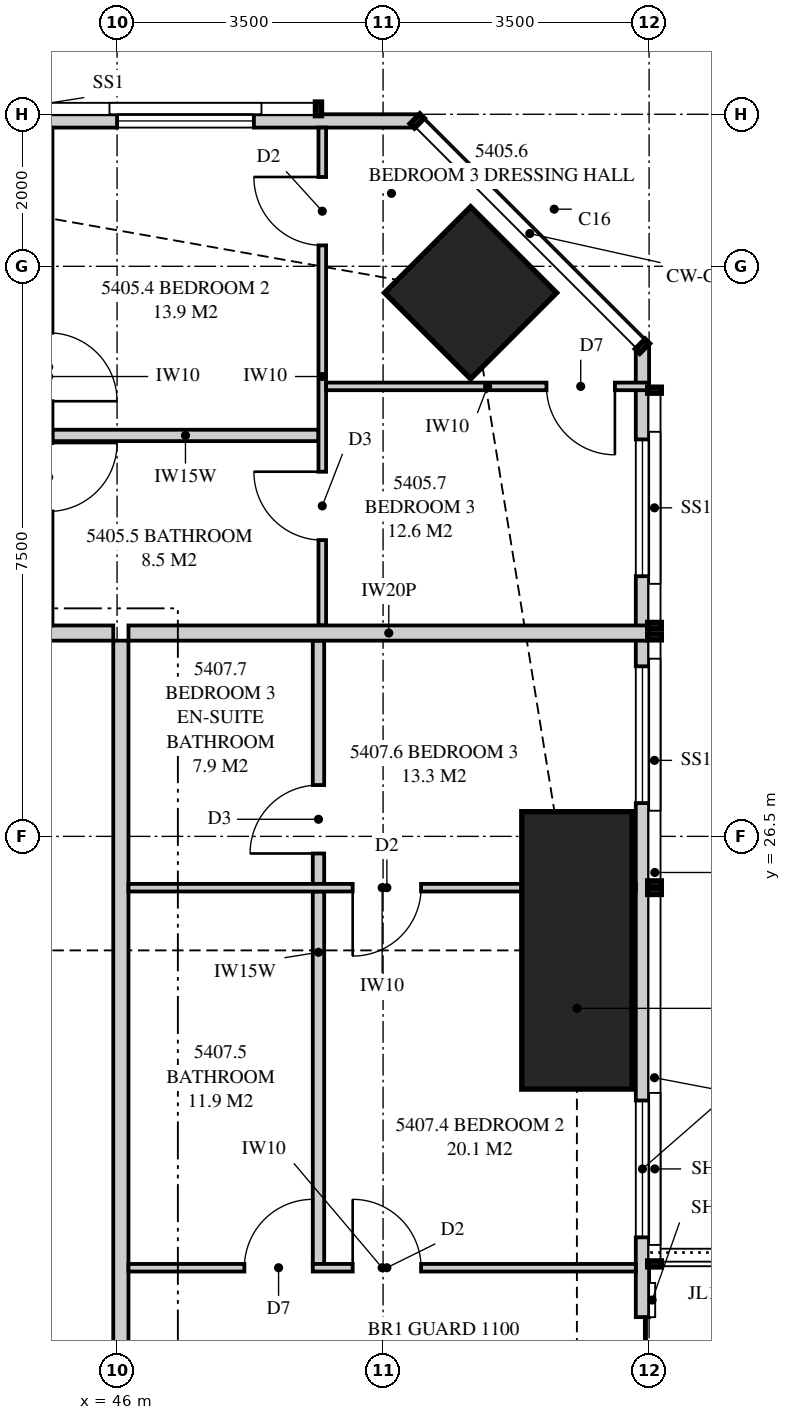
"""IFC4 building model, lengths in metres.
Left out: names, types, materials, properties, quantities, classifications, styles, units other than length and angle.
Written with IfcOpenShell. Run it as: python <this file> out.ifc"""

import sys

from ifc_helpers import new_model, si_unit, direction, frame, frame_2d, origin, origin_2d, place, context, subcontext, project, spatial, polyline, rectangle, outline, extrude, element, fill, save


model = new_model("IFC4")
c1 = context("Model", 3, precision=1e-05, world=origin(), true_north=direction((0.0, 1.0)))
c2 = subcontext(c1, "Body", "Model", "MODEL_VIEW")
j1 = project(units=[si_unit("LENGTHUNIT", "METRE"), si_unit("PLANEANGLEUNIT", "RADIAN")], contexts=[c1])
p1 = place(None, origin())
s1 = spatial("IfcSite", under=j1, at=p1, CompositionType="ELEMENT")
p2 = place(p1, origin())
s2 = spatial("IfcBuilding", under=s1, at=p2, CompositionType="ELEMENT")
p3 = place(p2, frame((0.0, 0.0, 197.9)))
s3 = spatial("IfcBuildingStorey", under=s2, at=p3, CompositionType="ELEMENT", Elevation=197.9)
p4 = place(p3, frame((52.05, 25.0, 0.0), z_axis=(0.0, 0.0, 1.0), x_axis=(1.0, 0.0, 0.0)))
e1 = element("IfcColumn", 1, at=p4, inside=s3, PredefinedType="COLUMN", context=c2, shape_type="SweptSolid", body=[
    extrude(rectangle(XDim=1.45, YDim=3.65, at=origin_2d()), origin(), (0.0, 0.0, 1.0), 3.35),
])
p5 = place(p3, frame((50.652, 33.652, 0.0), z_axis=(0.0, 0.0, 1.0), x_axis=(0.707106781187, 0.707106781187, 0.0)))
e2 = element("IfcColumn", 2, at=p5, inside=s3, PredefinedType="COLUMN", context=c2, shape_type="SweptSolid", body=[
    extrude(rectangle(XDim=1.6, YDim=1.6, at=origin_2d()), origin(), (0.0, 0.0, 1.0), 3.35),
])
p6 = place(p3, frame((52.913, 3.051, 0.0), z_axis=(0.0, 0.0, 1.0), x_axis=(0.0, 1.0, 0.0)))
e3 = element("IfcWall", 3, at=p6, inside=s3, PredefinedType="SOLIDWALL", context=c2, shape_type="SweptSolid", body=[
    extrude(outline(polyline([(0.0, 0.0), (29.897, 0.0), (29.897, 3.11), (22.167, 3.11), (22.167, 2.15), (22.074, 2.15), (22.074, 3.11), (21.949, 3.11), (21.949, 2.15), (9.949, 2.15), (9.949, 3.11), (9.847, 3.11), (9.847, 2.15), (9.706, 2.15), (9.706, 3.11), (0.0, 3.11), (0.0, 0.0)])), frame((0.0, 0.087, 0.0), z_axis=(0.0, -1.0, 0.0), x_axis=(1.0, 0.0, 0.0)), (0.0, 0.0, 1.0), 0.175),
])
p7 = place(p6, frame((5.374, 0.0, 0.4)))
e4 = element("IfcOpeningElement", 4, at=p7, cuts=e3, PredefinedType="OPENING", context=c2, shape_type="SweptSolid", body=[
    extrude(rectangle(XDim=1.8, YDim=1.7, at=frame_2d((0.9, 0.85))), frame((0.0, 0.097, 0.0), z_axis=(0.0, -1.0, 0.0), x_axis=(1.0, 0.0, 0.0)), (0.0, 0.0, 1.0), 0.195),
])
p8 = place(p6, frame((12.199, 0.0, 0.4)))
e5 = element("IfcOpeningElement", 5, at=p8, cuts=e3, PredefinedType="OPENING", context=c2, shape_type="SweptSolid", body=[
    extrude(rectangle(XDim=1.8, YDim=1.7, at=frame_2d((0.9, 0.85))), frame((0.0, 0.097, 0.0), z_axis=(0.0, -1.0, 0.0), x_axis=(1.0, 0.0, 0.0)), (0.0, 0.0, 1.0), 0.195),
])
p9 = place(p6, frame((15.324, 0.0, 0.0)))
e6 = element("IfcOpeningElement", 6, at=p9, cuts=e3, PredefinedType="OPENING", context=c2, shape_type="SweptSolid", body=[
    extrude(rectangle(XDim=1.8, YDim=2.1, at=frame_2d((0.9, 1.05))), frame((0.0, 0.097, 0.0), z_axis=(0.0, -1.0, 0.0), x_axis=(1.0, 0.0, 0.0)), (0.0, 0.0, 1.0), 0.195),
])
p10 = place(p6, frame((18.174, 0.0, 0.4)))
e7 = element("IfcOpeningElement", 7, at=p10, cuts=e3, PredefinedType="OPENING", context=c2, shape_type="SweptSolid", body=[
    extrude(rectangle(XDim=1.8, YDim=1.7, at=frame_2d((0.9, 0.85))), frame((0.0, 0.097, 0.0), z_axis=(0.0, -1.0, 0.0), x_axis=(1.0, 0.0, 0.0)), (0.0, 0.0, 1.0), 0.195),
])
p11 = place(p6, frame((23.886, 0.0, 0.4)))
e8 = element("IfcOpeningElement", 8, at=p11, cuts=e3, PredefinedType="OPENING", context=c2, shape_type="SweptSolid", body=[
    extrude(rectangle(XDim=1.8, YDim=1.7, at=frame_2d((0.9, 0.85))), frame((0.0, 0.097, 0.0), z_axis=(0.0, -1.0, 0.0), x_axis=(1.0, 0.0, 0.0)), (0.0, 0.0, 1.0), 0.195),
])
p12 = place(p6, frame((26.871, 0.0, 0.4)))
e9 = element("IfcOpeningElement", 9, at=p12, cuts=e3, PredefinedType="OPENING", context=c2, shape_type="SweptSolid", body=[
    extrude(rectangle(XDim=1.8, YDim=1.7, at=frame_2d((0.9, 0.85))), frame((0.0, 0.097, 0.0), z_axis=(0.0, -1.0, 0.0), x_axis=(1.0, 0.0, 0.0)), (0.0, 0.0, 1.0), 0.195),
])
p13 = place(p3, frame((49.949, 35.913, 0.0), z_axis=(0.0, 0.0, 1.0), x_axis=(-1.0, 0.0, 0.0)))
e10 = element("IfcWall", 10, at=p13, inside=s3, PredefinedType="SOLIDWALL", context=c2, shape_type="SweptSolid", body=[
    extrude(outline(polyline([(0.0, 0.0), (34.897, 0.0), (34.897, 3.11), (27.91, 3.11), (27.91, 2.15), (27.836, 2.15), (27.836, 3.11), (27.699, 3.11), (27.699, 2.15), (7.199, 2.15), (7.199, 3.11), (7.062, 3.11), (7.062, 2.15), (6.987, 2.15), (6.987, 3.11), (0.0, 3.11), (0.0, 0.0)])), frame((0.0, 0.087, 0.0), z_axis=(0.0, -1.0, 0.0), x_axis=(1.0, 0.0, 0.0)), (0.0, 0.0, 1.0), 0.175),
])
p14 = place(p13, frame((2.149, 0.0, 0.4)))
e11 = element("IfcOpeningElement", 11, at=p14, cuts=e10, PredefinedType="OPENING", context=c2, shape_type="SweptSolid", body=[
    extrude(rectangle(XDim=1.8, YDim=1.7, at=frame_2d((0.9, 0.85))), frame((0.0, 0.097, 0.0), z_axis=(0.0, -1.0, 0.0), x_axis=(1.0, 0.0, 0.0)), (0.0, 0.0, 1.0), 0.195),
])
p15 = place(p13, frame((9.636, 0.0, 0.4)))
e12 = element("IfcOpeningElement", 12, at=p15, cuts=e10, PredefinedType="OPENING", context=c2, shape_type="SweptSolid", body=[
    extrude(rectangle(XDim=1.8, YDim=1.7, at=frame_2d((0.9, 0.85))), frame((0.0, 0.097, 0.0), z_axis=(0.0, -1.0, 0.0), x_axis=(1.0, 0.0, 0.0)), (0.0, 0.0, 1.0), 0.195),
])
p16 = place(p13, frame((13.174, 0.0, 0.0)))
e13 = element("IfcOpeningElement", 13, at=p16, cuts=e10, PredefinedType="OPENING", context=c2, shape_type="SweptSolid", body=[
    extrude(rectangle(XDim=1.8, YDim=2.1, at=frame_2d((0.9, 1.05))), frame((0.0, 0.097, 0.0), z_axis=(0.0, -1.0, 0.0), x_axis=(1.0, 0.0, 0.0)), (0.0, 0.0, 1.0), 0.195),
])
p17 = place(p13, frame((19.374, 0.0, 0.4)))
e14 = element("IfcOpeningElement", 14, at=p17, cuts=e10, PredefinedType="OPENING", context=c2, shape_type="SweptSolid", body=[
    extrude(rectangle(XDim=1.8, YDim=1.7, at=frame_2d((0.9, 0.85))), frame((0.0, 0.097, 0.0), z_axis=(0.0, -1.0, 0.0), x_axis=(1.0, 0.0, 0.0)), (0.0, 0.0, 1.0), 0.195),
])
p18 = place(p13, frame((23.224, 0.0, 0.4)))
e15 = element("IfcOpeningElement", 15, at=p18, cuts=e10, PredefinedType="OPENING", context=c2, shape_type="SweptSolid", body=[
    extrude(rectangle(XDim=2.4, YDim=1.7, at=frame_2d((1.2, 0.85))), frame((0.0, 0.097, 0.0), z_axis=(0.0, -1.0, 0.0), x_axis=(1.0, 0.0, 0.0)), (0.0, 0.0, 1.0), 0.195),
])
p19 = place(p13, frame((32.399, 0.0, 0.4)))
e16 = element("IfcOpeningElement", 16, at=p19, cuts=e10, PredefinedType="OPENING", context=c2, shape_type="SweptSolid", body=[
    extrude(rectangle(XDim=1.8, YDim=1.7, at=frame_2d((0.9, 0.85))), frame((0.0, 0.097, 0.0), z_axis=(0.0, -1.0, 0.0), x_axis=(1.0, 0.0, 0.0)), (0.0, 0.0, 1.0), 0.195),
])
p20 = place(p3, frame((45.1, 35.825, 0.0), z_axis=(0.0, 0.0, 1.0), x_axis=(0.0, -1.0, 0.0)))
e17 = element("IfcWall", 17, at=p20, inside=s3, PredefinedType="PARTITIONING", context=c2, shape_type="SweptSolid", body=[
    extrude(outline(polyline([(0.0, 0.0), (6.55, 0.0), (6.55, 3.11), (2.064, 3.11), (2.064, 2.15), (0.318, 2.15), (0.318, 3.11), (0.0, 3.11), (0.0, 0.0)])), frame((0.0, 0.05, 0.0), z_axis=(0.0, -1.0, 0.0), x_axis=(1.0, 0.0, 0.0)), (0.0, 0.0, 1.0), 0.1),
])
p21 = place(p20, frame((2.7, 0.0, 0.0)))
e18 = element("IfcOpeningElement", 18, at=p21, cuts=e17, PredefinedType="OPENING", context=c2, shape_type="SweptSolid", body=[
    extrude(rectangle(XDim=0.9, YDim=2.1, at=frame_2d((0.45, 1.05))), frame((0.0, 0.06, 0.0), z_axis=(0.0, -1.0, 0.0), x_axis=(1.0, 0.0, 0.0)), (0.0, 0.0, 1.0), 0.12),
])
p22 = place(p20, frame((4.15, 0.0, 0.0)))
e19 = element("IfcOpeningElement", 19, at=p22, cuts=e17, PredefinedType="OPENING", context=c2, shape_type="SweptSolid", body=[
    extrude(rectangle(XDim=0.9, YDim=2.1, at=frame_2d((0.45, 1.05))), frame((0.0, 0.06, 0.0), z_axis=(0.0, -1.0, 0.0), x_axis=(1.0, 0.0, 0.0)), (0.0, 0.0, 1.0), 0.12),
])
p23 = place(p3, frame((48.7, 35.825, 0.0), z_axis=(0.0, 0.0, 1.0), x_axis=(0.0, -1.0, 0.0)))
e20 = element("IfcWall", 20, at=p23, inside=s3, PredefinedType="PARTITIONING", context=c2, shape_type="SweptSolid", body=[
    extrude(outline(polyline([(0.0, 0.0), (6.55, 0.0), (6.55, 3.11), (2.701, 3.11), (2.701, 2.15), (0.955, 2.15), (0.955, 3.11), (0.0, 3.11), (0.0, 0.0)])), frame((0.0, 0.05, 0.0), z_axis=(0.0, -1.0, 0.0), x_axis=(1.0, 0.0, 0.0)), (0.0, 0.0, 1.0), 0.1),
])
p24 = place(p23, frame((0.65, 0.0, 0.0)))
e21 = element("IfcOpeningElement", 21, at=p24, cuts=e20, PredefinedType="OPENING", context=c2, shape_type="SweptSolid", body=[
    extrude(rectangle(XDim=0.9, YDim=2.1, at=frame_2d((0.45, 1.05))), frame((0.0, 0.06, 0.0), z_axis=(0.0, -1.0, 0.0), x_axis=(1.0, 0.0, 0.0)), (0.0, 0.0, 1.0), 0.12),
])
p25 = place(p23, frame((4.527, 0.0, 0.0)))
e22 = element("IfcOpeningElement", 22, at=p25, cuts=e20, PredefinedType="OPENING", context=c2, shape_type="SweptSolid", body=[
    extrude(rectangle(XDim=0.9, YDim=2.1, at=frame_2d((0.45, 1.05))), frame((0.0, 0.06, 0.0), z_axis=(0.0, -1.0, 0.0), x_axis=(1.0, 0.0, 0.0)), (0.0, 0.0, 1.0), 0.12),
])
p26 = place(p3, frame((45.15, 31.775, 0.0), z_axis=(0.0, 0.0, 1.0), x_axis=(1.0, 0.0, 0.0)))
e23 = element("IfcWall", 23, at=p26, inside=s3, PredefinedType="PLUMBINGWALL", context=c2, shape_type="SweptSolid", body=[
    extrude(rectangle(XDim=3.5, YDim=0.15, at=frame_2d((1.75, 0.0))), origin(), (0.0, 0.0, 1.0), 3.11),
])
p27 = place(p3, frame((48.75, 32.42, 0.0), z_axis=(0.0, 0.0, 1.0), x_axis=(1.0, 0.0, 0.0)))
e24 = element("IfcWall", 24, at=p27, inside=s3, PredefinedType="PARTITIONING", context=c2, shape_type="SweptSolid", body=[
    extrude(outline(polyline([(0.0, 0.0), (4.25, 0.0), (4.25, 3.11), (2.972, 3.11), (2.972, 2.15), (1.229, 2.15), (1.229, 3.11), (0.0, 3.11), (0.0, 0.0)])), frame((0.0, 0.05, 0.0), z_axis=(0.0, -1.0, 0.0), x_axis=(1.0, 0.0, 0.0)), (0.0, 0.0, 1.0), 0.1),
])
p28 = place(p27, frame((2.9, 0.0, 0.0)))
e25 = element("IfcOpeningElement", 25, at=p28, cuts=e24, PredefinedType="OPENING", context=c2, shape_type="SweptSolid", body=[
    extrude(rectangle(XDim=0.9, YDim=2.1, at=frame_2d((0.45, 1.05))), frame((0.0, 0.06, 0.0), z_axis=(0.0, -1.0, 0.0), x_axis=(1.0, 0.0, 0.0)), (0.0, 0.0, 1.0), 0.12),
])
p29 = place(p3, frame((46.15, 29.175, 0.0), z_axis=(0.0, 0.0, 1.0), x_axis=(1.0, 0.0, 0.0)))
e26 = element("IfcWall", 26, at=p29, inside=s3, PredefinedType="PARTITIONING", context=c2, shape_type="SweptSolid", body=[
    extrude(outline(polyline([(0.0, 0.0), (6.85, 0.0), (6.85, 3.11), (6.147, 3.11), (6.147, 2.15), (4.303, 2.15), (4.303, 3.11), (0.0, 3.11), (0.0, 0.0)])), frame((0.0, 0.1, 0.0), z_axis=(0.0, -1.0, 0.0), x_axis=(1.0, 0.0, 0.0)), (0.0, 0.0, 1.0), 0.2),
])
p30 = place(p3, frame((46.05, 7.925, 0.0), z_axis=(0.0, 0.0, 1.0), x_axis=(0.0, 1.0, 0.0)))
e27 = element("IfcWall", 27, at=p30, inside=s3, PredefinedType="PARTITIONING", context=c2, shape_type="SweptSolid", body=[
    extrude(outline(polyline([(0.0, 0.0), (21.15, 0.0), (21.15, 3.11), (17.412, 3.11), (17.412, 2.541), (16.738, 2.541), (16.738, 3.11), (5.412, 3.11), (5.412, 2.541), (4.738, 2.541), (4.738, 3.11), (0.0, 3.11), (0.0, 0.0)])), frame((0.0, 0.1, 0.0), z_axis=(0.0, -1.0, 0.0), x_axis=(1.0, 0.0, 0.0)), (0.0, 0.0, 1.0), 0.2),
])
p31 = place(p30, frame((10.075, 0.0, 0.0)))
e28 = element("IfcOpeningElement", 28, at=p31, cuts=e27, PredefinedType="OPENING", context=c2, shape_type="SweptSolid", body=[
    extrude(rectangle(XDim=1.05, YDim=2.2, at=frame_2d((0.525, 1.1))), frame((0.0, 0.11, 0.0), z_axis=(0.0, -1.0, 0.0), x_axis=(1.0, 0.0, 0.0)), (0.0, 0.0, 1.0), 0.22),
])
p32 = place(p3, frame((52.825, 20.825, 0.0), z_axis=(0.0, 0.0, 1.0), x_axis=(-1.0, 0.0, 0.0)))
e29 = element("IfcWall", 29, at=p32, inside=s3, PredefinedType="PARTITIONING", context=c2, shape_type="SweptSolid", body=[
    extrude(outline(polyline([(0.0, 0.0), (6.675, 0.0), (6.675, 3.11), (1.635, 3.11), (1.635, 2.15), (0.0, 2.15), (0.0, 3.11), (0.0, 0.0)])), frame((0.0, 0.05, 0.0), z_axis=(0.0, -1.0, 0.0), x_axis=(1.0, 0.0, 0.0)), (0.0, 0.0, 1.0), 0.1),
])
p33 = place(p32, frame((2.825, 0.0, 0.0)))
e30 = element("IfcOpeningElement", 30, at=p33, cuts=e29, PredefinedType="OPENING", context=c2, shape_type="SweptSolid", body=[
    extrude(rectangle(XDim=0.9, YDim=2.1, at=frame_2d((0.45, 1.05))), frame((0.0, 0.06, 0.0), z_axis=(0.0, -1.0, 0.0), x_axis=(1.0, 0.0, 0.0)), (0.0, 0.0, 1.0), 0.12),
])
p34 = place(p32, frame((4.25, 0.0, 0.0)))
e31 = element("IfcOpeningElement", 31, at=p34, cuts=e29, PredefinedType="OPENING", context=c2, shape_type="SweptSolid", body=[
    extrude(rectangle(XDim=0.9, YDim=2.1, at=frame_2d((0.45, 1.05))), frame((0.0, 0.06, 0.0), z_axis=(0.0, -1.0, 0.0), x_axis=(1.0, 0.0, 0.0)), (0.0, 0.0, 1.0), 0.12),
])
p35 = place(p3, frame((52.825, 25.825, 0.0), z_axis=(0.0, 0.0, 1.0), x_axis=(-1.0, 0.0, 0.0)))
e32 = element("IfcWall", 32, at=p35, inside=s3, PredefinedType="PARTITIONING", context=c2, shape_type="SweptSolid", body=[
    extrude(outline(polyline([(0.037, 3.11), (0.0, 3.11), (0.0, 0.0), (0.529, 0.0), (0.529, 0.664), (1.021, 0.664), (1.021, 0.0), (6.675, 0.0), (6.675, 3.11), (1.78, 3.11), (1.78, 2.15), (1.021, 2.15), (1.021, 1.486), (0.529, 1.486), (0.529, 2.15), (0.037, 2.15), (0.037, 3.11)])), frame((0.0, 0.05, 0.0), z_axis=(0.0, -1.0, 0.0), x_axis=(1.0, 0.0, 0.0)), (0.0, 0.0, 1.0), 0.1),
])
p36 = place(p35, frame((2.825, 0.0, 0.0)))
e33 = element("IfcOpeningElement", 33, at=p36, cuts=e32, PredefinedType="OPENING", context=c2, shape_type="SweptSolid", body=[
    extrude(rectangle(XDim=0.9, YDim=2.1, at=frame_2d((0.45, 1.05))), frame((0.0, 0.06, 0.0), z_axis=(0.0, -1.0, 0.0), x_axis=(1.0, 0.0, 0.0)), (0.0, 0.0, 1.0), 0.12),
])
p37 = place(p3, frame((48.65, 20.875, 0.0), z_axis=(0.0, 0.0, 1.0), x_axis=(0.0, 1.0, 0.0)))
e34 = element("IfcWall", 34, at=p37, inside=s3, PredefinedType="PLUMBINGWALL", context=c2, shape_type="SweptSolid", body=[
    extrude(outline(polyline([(0.0, 0.0), (4.9, 0.0), (4.9, 3.11), (4.438, 3.11), (4.438, 2.541), (3.812, 2.541), (3.812, 3.11), (0.0, 3.11), (0.0, 0.0)])), frame((0.0, 0.075, 0.0), z_axis=(0.0, -1.0, 0.0), x_axis=(1.0, 0.0, 0.0)), (0.0, 0.0, 1.0), 0.15),
])
p38 = place(p3, frame((48.65, 25.875, 0.0), z_axis=(0.0, 0.0, 1.0), x_axis=(0.0, 1.0, 0.0)))
e35 = element("IfcWall", 35, at=p38, inside=s3, PredefinedType="PLUMBINGWALL", context=c2, shape_type="SweptSolid", body=[
    extrude(rectangle(XDim=3.2, YDim=0.15, at=frame_2d((1.6, 0.0))), origin(), (0.0, 0.0, 1.0), 3.11),
])
p39 = place(p38, frame((0.4, 0.0, 0.0)))
e36 = element("IfcOpeningElement", 36, at=p39, cuts=e35, PredefinedType="OPENING", context=c2, shape_type="SweptSolid", body=[
    extrude(rectangle(XDim=0.9, YDim=2.1, at=frame_2d((0.45, 1.05))), frame((0.0, 0.085, 0.0), z_axis=(0.0, -1.0, 0.0), x_axis=(1.0, 0.0, 0.0)), (0.0, 0.0, 1.0), 0.17),
])
p40 = place(p3, frame((44.85, 29.175, 0.0), z_axis=(0.0, 0.0, 1.0), x_axis=(1.0, 0.0, 0.0)))
e37 = element("IfcWall", 37, at=p40, inside=s3, PredefinedType="PARTITIONING", context=c2, shape_type="SweptSolid", body=[
    extrude(rectangle(XDim=1.1, YDim=0.2, at=frame_2d((0.55, 0.0))), origin(), (0.0, 0.0, 1.0), 3.11),
])
p41 = place(p9, origin())
e38 = element("IfcDoor", 38, at=p41, inside=s3, OperationType="SLIDING_TO_LEFT", PredefinedType="DOOR", context=c2, shape_type="SweptSolid", body=[
    extrude(rectangle(XDim=1.8, YDim=2.1, at=frame_2d((0.9, 1.05))), frame((0.0, 0.025, 0.0), z_axis=(0.0, -1.0, 0.0), x_axis=(1.0, 0.0, 0.0)), (0.0, 0.0, 1.0), 0.05),
])
fill(e6, e38)
p42 = place(p10, origin())
e39 = element("IfcWindow", 39, at=p42, inside=s3, PartitioningType="SINGLE_PANEL", PredefinedType="WINDOW", context=c2, shape_type="SweptSolid", body=[
    extrude(rectangle(XDim=1.8, YDim=1.7, at=frame_2d((0.9, 0.85))), frame((0.0, 0.03, 0.0), z_axis=(0.0, -1.0, 0.0), x_axis=(1.0, 0.0, 0.0)), (0.0, 0.0, 1.0), 0.06),
])
fill(e7, e39)
p43 = place(p11, origin())
e40 = element("IfcWindow", 40, at=p43, inside=s3, PartitioningType="SINGLE_PANEL", PredefinedType="WINDOW", context=c2, shape_type="SweptSolid", body=[
    extrude(rectangle(XDim=1.8, YDim=1.7, at=frame_2d((0.9, 0.85))), frame((0.0, 0.03, 0.0), z_axis=(0.0, -1.0, 0.0), x_axis=(1.0, 0.0, 0.0)), (0.0, 0.0, 1.0), 0.06),
])
fill(e8, e40)
p44 = place(p12, origin())
e41 = element("IfcWindow", 41, at=p44, inside=s3, PartitioningType="SINGLE_PANEL", PredefinedType="WINDOW", context=c2, shape_type="SweptSolid", body=[
    extrude(rectangle(XDim=1.8, YDim=1.7, at=frame_2d((0.9, 0.85))), frame((0.0, 0.03, 0.0), z_axis=(0.0, -1.0, 0.0), x_axis=(1.0, 0.0, 0.0)), (0.0, 0.0, 1.0), 0.06),
])
fill(e9, e41)
p45 = place(p14, origin())
e42 = element("IfcWindow", 42, at=p45, inside=s3, PartitioningType="SINGLE_PANEL", PredefinedType="WINDOW", context=c2, shape_type="SweptSolid", body=[
    extrude(rectangle(XDim=1.8, YDim=1.7, at=frame_2d((0.9, 0.85))), frame((0.0, 0.03, 0.0), z_axis=(0.0, -1.0, 0.0), x_axis=(1.0, 0.0, 0.0)), (0.0, 0.0, 1.0), 0.06),
])
fill(e11, e42)
p46 = place(p28, frame((0.9, 0.0, 0.0), z_axis=(0.0, 0.0, 1.0), x_axis=(-1.0, 0.0, 0.0)))
e43 = element("IfcDoor", 43, at=p46, inside=s3, OperationType="SINGLE_SWING_LEFT", PredefinedType="DOOR", context=c2, shape_type="SweptSolid", body=[
    extrude(rectangle(XDim=0.9, YDim=2.1, at=frame_2d((0.45, 1.05))), frame((0.0, 0.025, 0.0), z_axis=(0.0, -1.0, 0.0), x_axis=(1.0, 0.0, 0.0)), (0.0, 0.0, 1.0), 0.05),
])
fill(e25, e43)
p47 = place(p24, frame((0.9, 0.0, 0.0), z_axis=(0.0, 0.0, 1.0), x_axis=(-1.0, 0.0, 0.0)))
e44 = element("IfcDoor", 44, at=p47, inside=s3, OperationType="SINGLE_SWING_RIGHT", PredefinedType="DOOR", context=c2, shape_type="SweptSolid", body=[
    extrude(rectangle(XDim=0.9, YDim=2.1, at=frame_2d((0.45, 1.05))), frame((0.0, 0.025, 0.0), z_axis=(0.0, -1.0, 0.0), x_axis=(1.0, 0.0, 0.0)), (0.0, 0.0, 1.0), 0.05),
])
fill(e21, e44)
p48 = place(p25, frame((0.9, 0.0, 0.0), z_axis=(0.0, 0.0, 1.0), x_axis=(-1.0, 0.0, 0.0)))
e45 = element("IfcDoor", 45, at=p48, inside=s3, OperationType="SINGLE_SWING_RIGHT", PredefinedType="DOOR", context=c2, shape_type="SweptSolid", body=[
    extrude(rectangle(XDim=0.9, YDim=2.1, at=frame_2d((0.45, 1.05))), frame((0.0, 0.025, 0.0), z_axis=(0.0, -1.0, 0.0), x_axis=(1.0, 0.0, 0.0)), (0.0, 0.0, 1.0), 0.05),
])
fill(e22, e45)
p49 = place(p33, frame((0.9, 0.0, 0.0), z_axis=(0.0, 0.0, 1.0), x_axis=(-1.0, 0.0, 0.0)))
e46 = element("IfcDoor", 46, at=p49, inside=s3, OperationType="SINGLE_SWING_LEFT", PredefinedType="DOOR", context=c2, shape_type="SweptSolid", body=[
    extrude(rectangle(XDim=0.9, YDim=2.1, at=frame_2d((0.45, 1.05))), frame((0.0, 0.025, 0.0), z_axis=(0.0, -1.0, 0.0), x_axis=(1.0, 0.0, 0.0)), (0.0, 0.0, 1.0), 0.05),
])
fill(e30, e46)
p50 = place(p34, frame((0.9, 0.0, 0.0), z_axis=(0.0, 0.0, 1.0), x_axis=(-1.0, 0.0, 0.0)))
e47 = element("IfcDoor", 47, at=p50, inside=s3, OperationType="SINGLE_SWING_RIGHT", PredefinedType="DOOR", context=c2, shape_type="SweptSolid", body=[
    extrude(rectangle(XDim=0.9, YDim=2.1, at=frame_2d((0.45, 1.05))), frame((0.0, 0.025, 0.0), z_axis=(0.0, -1.0, 0.0), x_axis=(1.0, 0.0, 0.0)), (0.0, 0.0, 1.0), 0.05),
])
fill(e31, e47)
p51 = place(p36, origin())
e48 = element("IfcDoor", 48, at=p51, inside=s3, OperationType="SINGLE_SWING_RIGHT", PredefinedType="DOOR", context=c2, shape_type="SweptSolid", body=[
    extrude(rectangle(XDim=0.9, YDim=2.1, at=frame_2d((0.45, 1.05))), frame((0.0, 0.025, 0.0), z_axis=(0.0, -1.0, 0.0), x_axis=(1.0, 0.0, 0.0)), (0.0, 0.0, 1.0), 0.05),
])
fill(e33, e48)
p52 = place(p39, origin())
e49 = element("IfcDoor", 49, at=p52, inside=s3, OperationType="SINGLE_SWING_LEFT", PredefinedType="DOOR", context=c2, shape_type="SweptSolid", body=[
    extrude(rectangle(XDim=0.9, YDim=2.1, at=frame_2d((0.45, 1.05))), frame((0.0, 0.025, 0.0), z_axis=(0.0, -1.0, 0.0), x_axis=(1.0, 0.0, 0.0)), (0.0, 0.0, 1.0), 0.05),
])
fill(e36, e49)
save(model, sys.argv[1])
